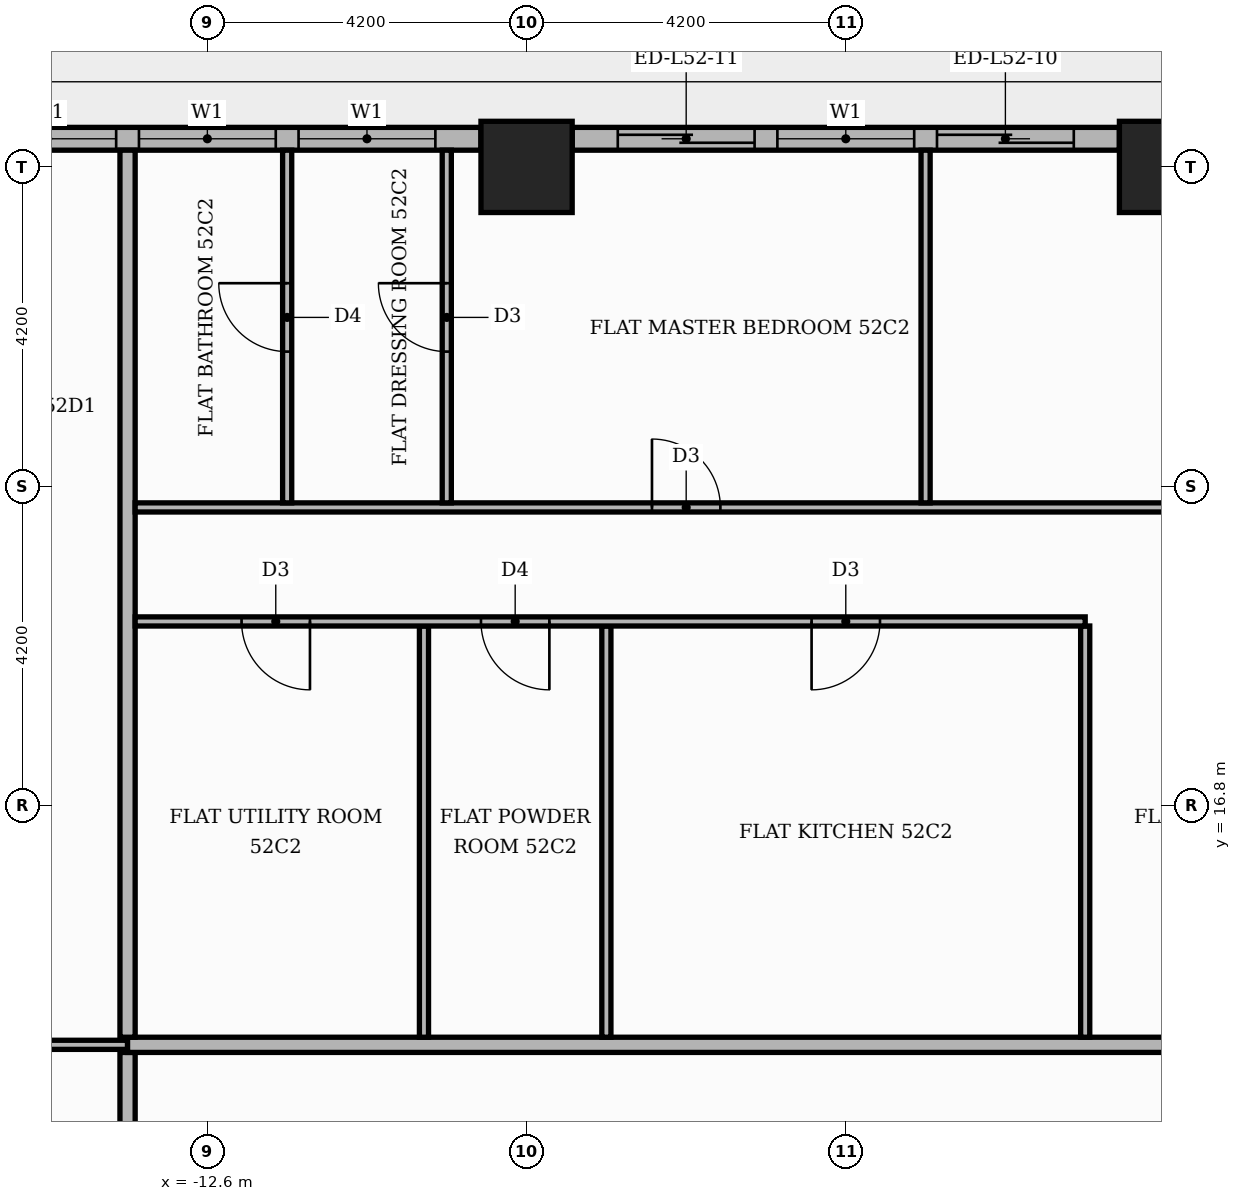
"""IFC4 building model, lengths in metres.
Left out: names, types, materials, properties, quantities, classifications, styles, units other than length and angle.
Written with IfcOpenShell. Run it as: python <this file> out.ifc"""

import sys

from ifc_helpers import new_model, si_unit, direction, frame, frame_2d, origin, origin_2d, place, context, subcontext, project, spatial, rectangle, extrude, element, fill, save


model = new_model("IFC4")
c1 = context("Model", 3, precision=1e-05, world=origin(), true_north=direction((0.0, 1.0)))
c2 = subcontext(c1, "Body", "Model", "MODEL_VIEW")
j1 = project(units=[si_unit("LENGTHUNIT", "METRE"), si_unit("PLANEANGLEUNIT", "RADIAN")], contexts=[c1])
p1 = place(None, origin())
s1 = spatial("IfcSite", under=j1, at=p1, CompositionType="ELEMENT")
p2 = place(p1, origin())
s2 = spatial("IfcBuilding", under=s1, at=p2, CompositionType="ELEMENT")
p3 = place(p2, frame((0.0, 0.0, 219.6)))
s3 = spatial("IfcBuildingStorey", under=s2, at=p3, CompositionType="ELEMENT", Elevation=219.6)
for number, where, z_axis, x_axis in (
    (1, (0.0, 25.2, 0.0), (0.0, 0.0, 1.0), (1.0, 0.0, 0.0)),
    (2, (-8.4, 25.2, 0.0), (0.0, 0.0, 1.0), (1.0, 0.0, 0.0)),
):
    element("IfcColumn", number, at=place(p3, frame(where, z_axis=z_axis, x_axis=x_axis)), inside=s3, PredefinedType="COLUMN", context=c2, shape_type="SweptSolid", body=[
        extrude(rectangle(XDim=1.2, YDim=1.2, at=origin_2d()), origin(), (0.0, 0.0, 1.0), 3.9),
    ])
p4 = place(p3, frame((-0.6, 25.57, 0.0), z_axis=(0.0, 0.0, 1.0), x_axis=(-1.0, 0.0, 0.0)))
e3 = element("IfcWall", 3, at=p4, inside=s3, PredefinedType="STANDARD", context=c2, shape_type="SweptSolid", body=[
    extrude(rectangle(XDim=7.2, YDim=0.3, at=frame_2d((3.6, 0.0))), origin(), (0.0, 0.0, 1.0), 3.48),
])
p5 = place(p4, frame((0.6, 0.0, 0.0)))
e4 = element("IfcOpeningElement", 4, at=p5, cuts=e3, PredefinedType="OPENING", context=c2, shape_type="SweptSolid", body=[
    extrude(rectangle(XDim=1.8, YDim=2.4, at=frame_2d((0.9, 1.2))), frame((0.0, 0.16, 0.0), z_axis=(0.0, -1.0, 0.0), x_axis=(1.0, 0.0, 0.0)), (0.0, 0.0, 1.0), 0.32),
])
p6 = place(p4, frame((2.7, 0.0, 0.9)))
e5 = element("IfcOpeningElement", 5, at=p6, cuts=e3, PredefinedType="OPENING", context=c2, shape_type="SweptSolid", body=[
    extrude(rectangle(XDim=1.8, YDim=2.1, at=frame_2d((0.9, 1.05))), frame((0.0, 0.16, 0.0), z_axis=(0.0, -1.0, 0.0), x_axis=(1.0, 0.0, 0.0)), (0.0, 0.0, 1.0), 0.32),
])
p7 = place(p4, frame((4.8, 0.0, 0.0)))
e6 = element("IfcOpeningElement", 6, at=p7, cuts=e3, PredefinedType="OPENING", context=c2, shape_type="SweptSolid", body=[
    extrude(rectangle(XDim=1.8, YDim=2.4, at=frame_2d((0.9, 1.2))), frame((0.0, 0.16, 0.0), z_axis=(0.0, -1.0, 0.0), x_axis=(1.0, 0.0, 0.0)), (0.0, 0.0, 1.0), 0.32),
])
p8 = place(p3, frame((-9.0, 25.57, 0.0), z_axis=(0.0, 0.0, 1.0), x_axis=(-1.0, 0.0, 0.0)))
e7 = element("IfcWall", 7, at=p8, inside=s3, PredefinedType="STANDARD", context=c2, shape_type="SweptSolid", body=[
    extrude(rectangle(XDim=7.2, YDim=0.3, at=frame_2d((3.6, 0.0))), origin(), (0.0, 0.0, 1.0), 3.48),
])
p9 = place(p8, frame((0.6, 0.0, 0.9)))
e8 = element("IfcOpeningElement", 8, at=p9, cuts=e7, PredefinedType="OPENING", context=c2, shape_type="SweptSolid", body=[
    extrude(rectangle(XDim=1.8, YDim=2.1, at=frame_2d((0.9, 1.05))), frame((0.0, 0.16, 0.0), z_axis=(0.0, -1.0, 0.0), x_axis=(1.0, 0.0, 0.0)), (0.0, 0.0, 1.0), 0.32),
])
p10 = place(p8, frame((2.7, 0.0, 0.9)))
e9 = element("IfcOpeningElement", 9, at=p10, cuts=e7, PredefinedType="OPENING", context=c2, shape_type="SweptSolid", body=[
    extrude(rectangle(XDim=1.8, YDim=2.1, at=frame_2d((0.9, 1.05))), frame((0.0, 0.16, 0.0), z_axis=(0.0, -1.0, 0.0), x_axis=(1.0, 0.0, 0.0)), (0.0, 0.0, 1.0), 0.32),
])
p11 = place(p8, frame((4.8, 0.0, 0.9)))
e10 = element("IfcOpeningElement", 10, at=p11, cuts=e7, PredefinedType="OPENING", context=c2, shape_type="SweptSolid", body=[
    extrude(rectangle(XDim=1.8, YDim=2.1, at=frame_2d((0.9, 1.05))), frame((0.0, 0.16, 0.0), z_axis=(0.0, -1.0, 0.0), x_axis=(1.0, 0.0, 0.0)), (0.0, 0.0, 1.0), 0.32),
])
p12 = place(p3, frame((-13.65, -13.55, 0.0), z_axis=(0.0, 0.0, 1.0), x_axis=(0.0, 1.0, 0.0)))
e11 = element("IfcWall", 11, at=p12, inside=s3, PredefinedType="PARTITIONING", context=c2, shape_type="SweptSolid", body=[
    extrude(rectangle(XDim=27.1, YDim=0.2, at=frame_2d((13.55, 0.0))), origin(), (0.0, 0.0, 1.0), 3.48),
])
p13 = place(p12, frame((23.5, 0.0, 0.0)))
e12 = element("IfcOpeningElement", 12, at=p13, cuts=e11, PredefinedType="OPENING", context=c2, shape_type="SweptSolid", body=[
    extrude(rectangle(XDim=1.1, YDim=2.4, at=frame_2d((0.55, 1.2))), frame((0.0, 0.11, 0.0), z_axis=(0.0, -1.0, 0.0), x_axis=(1.0, 0.0, 0.0)), (0.0, 0.0, 1.0), 0.22),
])
p14 = place(p3, frame((-19.82, 13.65, 0.0), z_axis=(0.0, 0.0, 1.0), x_axis=(1.0, 0.0, 0.0)))
e13 = element("IfcWall", 13, at=p14, inside=s3, PredefinedType="PARTITIONING", context=c2, shape_type="SweptSolid", body=[
    extrude(rectangle(XDim=6.17, YDim=0.12, at=frame_2d((3.085, 0.0))), origin(), (0.0, 0.0, 1.0), 3.48),
])
p15 = place(p14, frame((2.635, 0.0, 0.0)))
e14 = element("IfcOpeningElement", 14, at=p15, cuts=e13, PredefinedType="OPENING", context=c2, shape_type="SweptSolid", body=[
    extrude(rectangle(XDim=0.9, YDim=2.1, at=frame_2d((0.45, 1.05))), frame((0.0, 0.07, 0.0), z_axis=(0.0, -1.0, 0.0), x_axis=(1.0, 0.0, 0.0)), (0.0, 0.0, 1.0), 0.14),
])
p16 = place(p3, frame((-13.65, 13.65, 0.0), z_axis=(0.0, 0.0, 1.0), x_axis=(1.0, 0.0, 0.0)))
e15 = element("IfcWall", 15, at=p16, inside=s3, PredefinedType="PARTITIONING", context=c2, shape_type="SweptSolid", body=[
    extrude(rectangle(XDim=39.07, YDim=0.2, at=frame_2d((19.535, 0.0))), origin(), (0.0, 0.0, 1.0), 3.48),
])
p17 = place(p16, frame((24.65, 0.0, 0.0)))
e16 = element("IfcOpeningElement", 16, at=p17, cuts=e15, PredefinedType="OPENING", context=c2, shape_type="SweptSolid", body=[
    extrude(rectangle(XDim=1.1, YDim=2.4, at=frame_2d((0.55, 1.2))), frame((0.0, 0.11, 0.0), z_axis=(0.0, -1.0, 0.0), x_axis=(1.0, 0.0, 0.0)), (0.0, 0.0, 1.0), 0.22),
])
p18 = place(p16, frame((14.15, 0.0, 0.0)))
e17 = element("IfcOpeningElement", 17, at=p18, cuts=e15, PredefinedType="OPENING", context=c2, shape_type="SweptSolid", body=[
    extrude(rectangle(XDim=1.1, YDim=2.4, at=frame_2d((0.55, 1.2))), frame((0.0, 0.11, 0.0), z_axis=(0.0, -1.0, 0.0), x_axis=(1.0, 0.0, 0.0)), (0.0, 0.0, 1.0), 0.22),
])
p19 = place(p3, frame((-13.65, 13.75, 0.0), z_axis=(0.0, 0.0, 1.0), x_axis=(0.0, 1.0, 0.0)))
e18 = element("IfcWall", 18, at=p19, inside=s3, PredefinedType="PARTITIONING", context=c2, shape_type="SweptSolid", body=[
    extrude(rectangle(XDim=11.67, YDim=0.2, at=frame_2d((5.835, 0.0))), origin(), (0.0, 0.0, 1.0), 3.48),
])
for number, where, z_axis, x_axis in (
    (19, (-9.75, 13.75, 0.0), (0.0, 0.0, 1.0), (0.0, 1.0, 0.0)),
    (20, (-7.35, 13.75, 0.0), (0.0, 0.0, 1.0), (0.0, 1.0, 0.0)),
    (21, (-1.05, 13.75, 0.0), (0.0, 0.0, 1.0), (0.0, 1.0, 0.0)),
):
    element("IfcWall", number, at=place(p3, frame(where, z_axis=z_axis, x_axis=x_axis)), inside=s3, PredefinedType="PARTITIONING", context=c2, shape_type="SweptSolid", body=[
        extrude(rectangle(XDim=5.41, YDim=0.12, at=frame_2d((2.705, 0.0))), origin(), (0.0, 0.0, 1.0), 3.48),
    ])
p20 = place(p3, frame((-13.55, 19.22, 0.0), z_axis=(0.0, 0.0, 1.0), x_axis=(1.0, 0.0, 0.0)))
e22 = element("IfcWall", 22, at=p20, inside=s3, PredefinedType="PARTITIONING", context=c2, shape_type="SweptSolid", body=[
    extrude(rectangle(XDim=12.5, YDim=0.12, at=frame_2d((6.25, 0.0))), origin(), (0.0, 0.0, 1.0), 3.48),
])
p21 = place(p20, frame((8.9, 0.0, 0.0)))
e23 = element("IfcOpeningElement", 23, at=p21, cuts=e22, PredefinedType="OPENING", context=c2, shape_type="SweptSolid", body=[
    extrude(rectangle(XDim=0.9, YDim=2.1, at=frame_2d((0.45, 1.05))), frame((0.0, 0.07, 0.0), z_axis=(0.0, -1.0, 0.0), x_axis=(1.0, 0.0, 0.0)), (0.0, 0.0, 1.0), 0.14),
])
p22 = place(p20, frame((4.55, 0.0, 0.0)))
e24 = element("IfcOpeningElement", 24, at=p22, cuts=e22, PredefinedType="OPENING", context=c2, shape_type="SweptSolid", body=[
    extrude(rectangle(XDim=0.9, YDim=2.1, at=frame_2d((0.45, 1.05))), frame((0.0, 0.07, 0.0), z_axis=(0.0, -1.0, 0.0), x_axis=(1.0, 0.0, 0.0)), (0.0, 0.0, 1.0), 0.14),
])
p23 = place(p20, frame((1.4, 0.0, 0.0)))
e25 = element("IfcOpeningElement", 25, at=p23, cuts=e22, PredefinedType="OPENING", context=c2, shape_type="SweptSolid", body=[
    extrude(rectangle(XDim=0.9, YDim=2.1, at=frame_2d((0.45, 1.05))), frame((0.0, 0.07, 0.0), z_axis=(0.0, -1.0, 0.0), x_axis=(1.0, 0.0, 0.0)), (0.0, 0.0, 1.0), 0.14),
])
p24 = place(p3, frame((-13.55, 20.72, 0.0), z_axis=(0.0, 0.0, 1.0), x_axis=(1.0, 0.0, 0.0)))
e26 = element("IfcWall", 26, at=p24, inside=s3, PredefinedType="PARTITIONING", context=c2, shape_type="SweptSolid", body=[
    extrude(rectangle(XDim=18.7, YDim=0.12, at=frame_2d((9.35, 0.0))), origin(), (0.0, 0.0, 1.0), 3.48),
])
p25 = place(p24, frame((14.1, 0.0, 0.0)))
e27 = element("IfcOpeningElement", 27, at=p25, cuts=e26, PredefinedType="OPENING", context=c2, shape_type="SweptSolid", body=[
    extrude(rectangle(XDim=1.0, YDim=2.1, at=frame_2d((0.5, 1.05))), frame((0.0, 0.07, 0.0), z_axis=(0.0, -1.0, 0.0), x_axis=(1.0, 0.0, 0.0)), (0.0, 0.0, 1.0), 0.14),
])
p26 = place(p24, frame((6.8, 0.0, 0.0)))
e28 = element("IfcOpeningElement", 28, at=p26, cuts=e26, PredefinedType="OPENING", context=c2, shape_type="SweptSolid", body=[
    extrude(rectangle(XDim=0.9, YDim=2.1, at=frame_2d((0.45, 1.05))), frame((0.0, 0.07, 0.0), z_axis=(0.0, -1.0, 0.0), x_axis=(1.0, 0.0, 0.0)), (0.0, 0.0, 1.0), 0.14),
])
p27 = place(p3, frame((-11.55, 20.78, 0.0), z_axis=(0.0, 0.0, 1.0), x_axis=(0.0, 1.0, 0.0)))
e29 = element("IfcWall", 29, at=p27, inside=s3, PredefinedType="PARTITIONING", context=c2, shape_type="SweptSolid", body=[
    extrude(rectangle(XDim=4.64, YDim=0.12, at=frame_2d((2.32, 0.0))), origin(), (0.0, 0.0, 1.0), 3.48),
])
p28 = place(p27, frame((1.99, 0.0, 0.0)))
e30 = element("IfcOpeningElement", 30, at=p28, cuts=e29, PredefinedType="OPENING", context=c2, shape_type="SweptSolid", body=[
    extrude(rectangle(XDim=0.9, YDim=2.1, at=frame_2d((0.45, 1.05))), frame((0.0, 0.07, 0.0), z_axis=(0.0, -1.0, 0.0), x_axis=(1.0, 0.0, 0.0)), (0.0, 0.0, 1.0), 0.14),
])
p29 = place(p3, frame((-9.45, 20.78, 0.0), z_axis=(0.0, 0.0, 1.0), x_axis=(0.0, 1.0, 0.0)))
e31 = element("IfcWall", 31, at=p29, inside=s3, PredefinedType="PARTITIONING", context=c2, shape_type="SweptSolid", body=[
    extrude(rectangle(XDim=4.64, YDim=0.12, at=frame_2d((2.32, 0.0))), origin(), (0.0, 0.0, 1.0), 3.48),
])
p30 = place(p29, frame((1.99, 0.0, 0.0)))
e32 = element("IfcOpeningElement", 32, at=p30, cuts=e31, PredefinedType="OPENING", context=c2, shape_type="SweptSolid", body=[
    extrude(rectangle(XDim=0.9, YDim=2.1, at=frame_2d((0.45, 1.05))), frame((0.0, 0.07, 0.0), z_axis=(0.0, -1.0, 0.0), x_axis=(1.0, 0.0, 0.0)), (0.0, 0.0, 1.0), 0.14),
])
p31 = place(p3, frame((-3.15, 20.78, 0.0), z_axis=(0.0, 0.0, 1.0), x_axis=(0.0, 1.0, 0.0)))
e33 = element("IfcWall", 33, at=p31, inside=s3, PredefinedType="PARTITIONING", context=c2, shape_type="SweptSolid", body=[
    extrude(rectangle(XDim=4.64, YDim=0.12, at=frame_2d((2.32, 0.0))), origin(), (0.0, 0.0, 1.0), 3.48),
])
p32 = place(p5, origin())
e34 = element("IfcDoor", 34, at=p32, inside=s3, OperationType="SLIDING_TO_LEFT", PredefinedType="DOOR", context=c2, shape_type="SweptSolid", body=[
    extrude(rectangle(XDim=1.8, YDim=2.4, at=frame_2d((0.9, 1.2))), frame((0.0, 0.025, 0.0), z_axis=(0.0, -1.0, 0.0), x_axis=(1.0, 0.0, 0.0)), (0.0, 0.0, 1.0), 0.05),
])
fill(e4, e34)
p33 = place(p6, origin())
e35 = element("IfcWindow", 35, at=p33, inside=s3, PartitioningType="SINGLE_PANEL", PredefinedType="WINDOW", context=c2, shape_type="SweptSolid", body=[
    extrude(rectangle(XDim=1.8, YDim=2.1, at=frame_2d((0.9, 1.05))), frame((0.0, 0.03, 0.0), z_axis=(0.0, -1.0, 0.0), x_axis=(1.0, 0.0, 0.0)), (0.0, 0.0, 1.0), 0.06),
])
fill(e5, e35)
p34 = place(p7, origin())
e36 = element("IfcDoor", 36, at=p34, inside=s3, OperationType="SLIDING_TO_RIGHT", PredefinedType="DOOR", context=c2, shape_type="SweptSolid", body=[
    extrude(rectangle(XDim=1.8, YDim=2.4, at=frame_2d((0.9, 1.2))), frame((0.0, 0.025, 0.0), z_axis=(0.0, -1.0, 0.0), x_axis=(1.0, 0.0, 0.0)), (0.0, 0.0, 1.0), 0.05),
])
fill(e6, e36)
p35 = place(p9, origin())
e37 = element("IfcWindow", 37, at=p35, inside=s3, PartitioningType="SINGLE_PANEL", PredefinedType="WINDOW", context=c2, shape_type="SweptSolid", body=[
    extrude(rectangle(XDim=1.8, YDim=2.1, at=frame_2d((0.9, 1.05))), frame((0.0, 0.03, 0.0), z_axis=(0.0, -1.0, 0.0), x_axis=(1.0, 0.0, 0.0)), (0.0, 0.0, 1.0), 0.06),
])
fill(e8, e37)
p36 = place(p10, origin())
e38 = element("IfcWindow", 38, at=p36, inside=s3, PartitioningType="SINGLE_PANEL", PredefinedType="WINDOW", context=c2, shape_type="SweptSolid", body=[
    extrude(rectangle(XDim=1.8, YDim=2.1, at=frame_2d((0.9, 1.05))), frame((0.0, 0.03, 0.0), z_axis=(0.0, -1.0, 0.0), x_axis=(1.0, 0.0, 0.0)), (0.0, 0.0, 1.0), 0.06),
])
fill(e9, e38)
p37 = place(p11, origin())
e39 = element("IfcWindow", 39, at=p37, inside=s3, PartitioningType="SINGLE_PANEL", PredefinedType="WINDOW", context=c2, shape_type="SweptSolid", body=[
    extrude(rectangle(XDim=1.8, YDim=2.1, at=frame_2d((0.9, 1.05))), frame((0.0, 0.03, 0.0), z_axis=(0.0, -1.0, 0.0), x_axis=(1.0, 0.0, 0.0)), (0.0, 0.0, 1.0), 0.06),
])
fill(e10, e39)
p38 = place(p21, frame((0.9, 0.0, 0.0), z_axis=(0.0, 0.0, 1.0), x_axis=(-1.0, 0.0, 0.0)))
e40 = element("IfcDoor", 40, at=p38, inside=s3, OperationType="SINGLE_SWING_LEFT", PredefinedType="DOOR", context=c2, shape_type="SweptSolid", body=[
    extrude(rectangle(XDim=0.9, YDim=2.1, at=frame_2d((0.45, 1.05))), frame((0.0, 0.025, 0.0), z_axis=(0.0, -1.0, 0.0), x_axis=(1.0, 0.0, 0.0)), (0.0, 0.0, 1.0), 0.05),
])
fill(e23, e40)
p39 = place(p22, frame((0.9, 0.0, 0.0), z_axis=(0.0, 0.0, 1.0), x_axis=(-1.0, 0.0, 0.0)))
e41 = element("IfcDoor", 41, at=p39, inside=s3, OperationType="SINGLE_SWING_RIGHT", PredefinedType="DOOR", context=c2, shape_type="SweptSolid", body=[
    extrude(rectangle(XDim=0.9, YDim=2.1, at=frame_2d((0.45, 1.05))), frame((0.0, 0.025, 0.0), z_axis=(0.0, -1.0, 0.0), x_axis=(1.0, 0.0, 0.0)), (0.0, 0.0, 1.0), 0.05),
])
fill(e24, e41)
p40 = place(p23, frame((0.9, 0.0, 0.0), z_axis=(0.0, 0.0, 1.0), x_axis=(-1.0, 0.0, 0.0)))
e42 = element("IfcDoor", 42, at=p40, inside=s3, OperationType="SINGLE_SWING_RIGHT", PredefinedType="DOOR", context=c2, shape_type="SweptSolid", body=[
    extrude(rectangle(XDim=0.9, YDim=2.1, at=frame_2d((0.45, 1.05))), frame((0.0, 0.025, 0.0), z_axis=(0.0, -1.0, 0.0), x_axis=(1.0, 0.0, 0.0)), (0.0, 0.0, 1.0), 0.05),
])
fill(e25, e42)
p41 = place(p26, origin())
e43 = element("IfcDoor", 43, at=p41, inside=s3, OperationType="SINGLE_SWING_LEFT", PredefinedType="DOOR", context=c2, shape_type="SweptSolid", body=[
    extrude(rectangle(XDim=0.9, YDim=2.1, at=frame_2d((0.45, 1.05))), frame((0.0, 0.025, 0.0), z_axis=(0.0, -1.0, 0.0), x_axis=(1.0, 0.0, 0.0)), (0.0, 0.0, 1.0), 0.05),
])
fill(e28, e43)
p42 = place(p30, origin())
e44 = element("IfcDoor", 44, at=p42, inside=s3, OperationType="SINGLE_SWING_RIGHT", PredefinedType="DOOR", context=c2, shape_type="SweptSolid", body=[
    extrude(rectangle(XDim=0.9, YDim=2.1, at=frame_2d((0.45, 1.05))), frame((0.0, 0.025, 0.0), z_axis=(0.0, -1.0, 0.0), x_axis=(1.0, 0.0, 0.0)), (0.0, 0.0, 1.0), 0.05),
])
fill(e32, e44)
p43 = place(p28, origin())
e45 = element("IfcDoor", 45, at=p43, inside=s3, OperationType="SINGLE_SWING_RIGHT", PredefinedType="DOOR", context=c2, shape_type="SweptSolid", body=[
    extrude(rectangle(XDim=0.9, YDim=2.1, at=frame_2d((0.45, 1.05))), frame((0.0, 0.025, 0.0), z_axis=(0.0, -1.0, 0.0), x_axis=(1.0, 0.0, 0.0)), (0.0, 0.0, 1.0), 0.05),
])
fill(e30, e45)
save(model, sys.argv[1])
